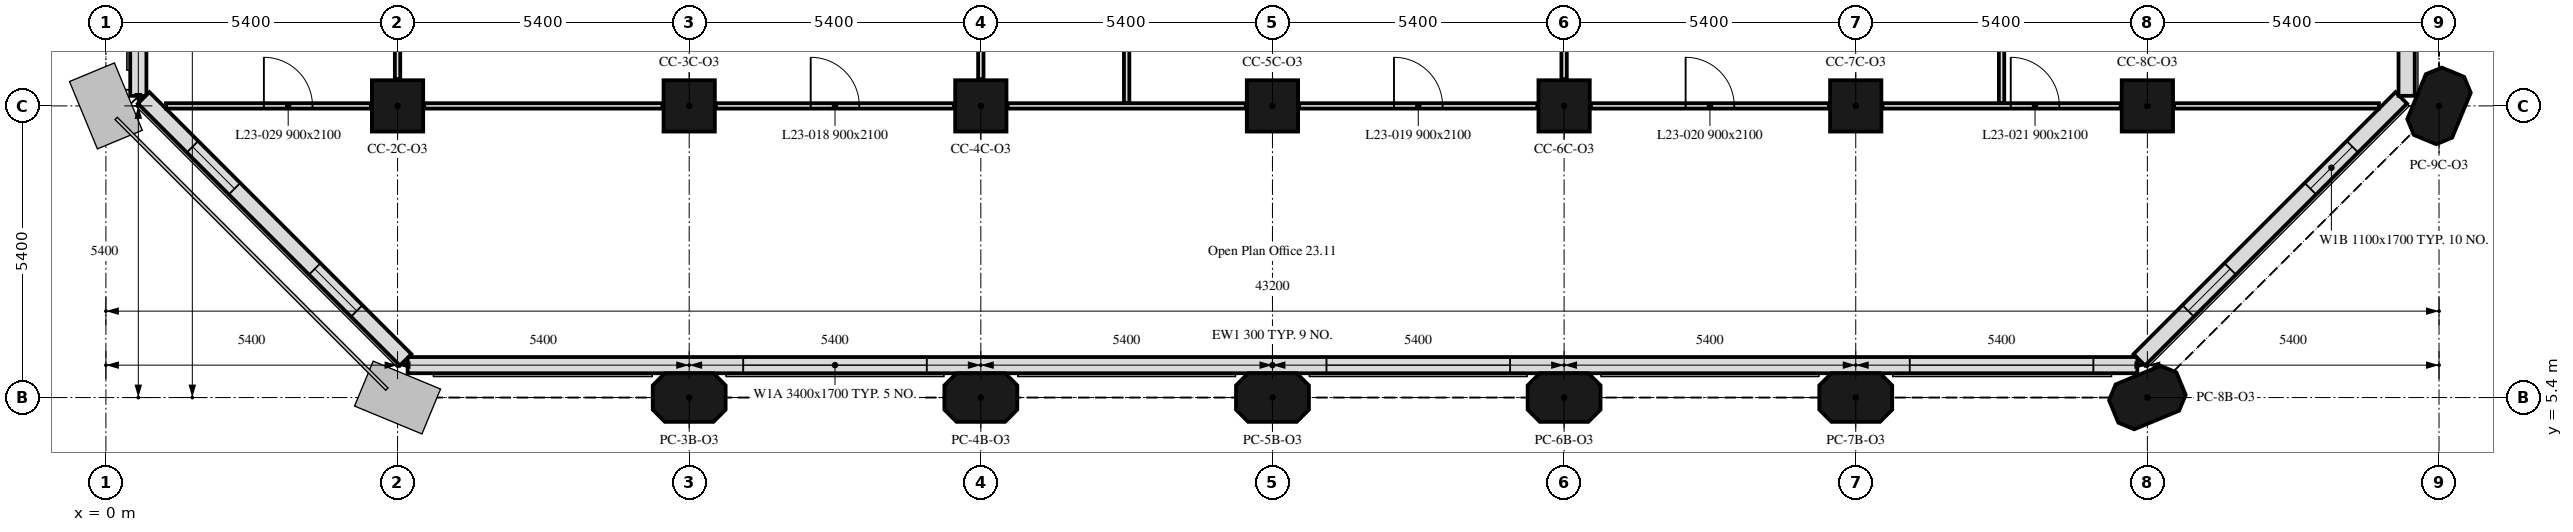
"""IFC4 building model, lengths in metres.
Left out: names, types, materials, properties, quantities, classifications, styles, units other than length and angle.
Written with IfcOpenShell. Run it as: python <this file> out.ifc"""

import sys

from ifc_helpers import new_model, si_unit, direction, frame, frame_2d, origin, origin_2d, place, context, subcontext, project, spatial, polyline, rectangle, outline, extrude, element, fill, save


model = new_model("IFC4")
c1 = context("Model", 3, precision=1e-05, world=origin(), true_north=direction((0.0, 1.0)))
c2 = subcontext(c1, "Body", "Model", "MODEL_VIEW")
j1 = project(units=[si_unit("LENGTHUNIT", "METRE"), si_unit("PLANEANGLEUNIT", "RADIAN")], contexts=[c1])
p1 = place(None, origin())
s1 = spatial("IfcSite", under=j1, at=p1, CompositionType="ELEMENT")
p2 = place(p1, origin())
s2 = spatial("IfcBuilding", under=s1, at=p2, CompositionType="ELEMENT")
p3 = place(p2, frame((0.0, 0.0, 99.2)))
s3 = spatial("IfcBuildingStorey", under=s2, at=p3, CompositionType="ELEMENT", Elevation=99.2)
for number, where, z_axis, x_axis in (
    (1, (10.8, 5.4, 0.0), (0.0, 0.0, 1.0), (1.0, 0.0, 0.0)),
    (2, (16.2, 5.4, 0.0), (0.0, 0.0, 1.0), (1.0, 0.0, 0.0)),
    (3, (21.6, 5.4, 0.0), (0.0, 0.0, 1.0), (1.0, 0.0, 0.0)),
    (4, (27.0, 5.4, 0.0), (0.0, 0.0, 1.0), (1.0, 0.0, 0.0)),
    (5, (32.4, 5.4, 0.0), (0.0, 0.0, 1.0), (1.0, 0.0, 0.0)),
    (6, (37.8, 5.4, 0.0), (0.0, 0.0, 1.0), (0.924, 0.383, 0.0)),
):
    element("IfcColumn", number, at=place(p3, frame(where, z_axis=z_axis, x_axis=x_axis)), inside=s3, PredefinedType="COLUMN", context=c2, shape_type="SweptSolid", body=[
        extrude(outline(polyline([(-0.45, -0.45), (0.45, -0.45), (0.675, -0.225), (0.675, 0.225), (0.45, 0.45), (-0.45, 0.45), (-0.675, 0.225), (-0.675, -0.225), (-0.45, -0.45)])), origin(), (0.0, 0.0, 1.0), 3.5),
    ])
for number, where, z_axis, x_axis in (
    (7, (5.4, 10.8, 0.0), (0.0, 0.0, 1.0), (1.0, 0.0, 0.0)),
    (8, (10.8, 10.8, 0.0), (0.0, 0.0, 1.0), (1.0, 0.0, 0.0)),
    (9, (16.2, 10.8, 0.0), (0.0, 0.0, 1.0), (1.0, 0.0, 0.0)),
    (10, (21.6, 10.8, 0.0), (0.0, 0.0, 1.0), (1.0, 0.0, 0.0)),
    (11, (27.0, 10.8, 0.0), (0.0, 0.0, 1.0), (1.0, 0.0, 0.0)),
    (12, (32.4, 10.8, 0.0), (0.0, 0.0, 1.0), (1.0, 0.0, 0.0)),
    (13, (37.8, 10.8, 0.0), (0.0, 0.0, 1.0), (1.0, 0.0, 0.0)),
):
    element("IfcColumn", number, at=place(p3, frame(where, z_axis=z_axis, x_axis=x_axis)), inside=s3, PredefinedType="COLUMN", context=c2, shape_type="SweptSolid", body=[
        extrude(rectangle(XDim=0.95, YDim=0.95, at=origin_2d()), origin(), (0.0, 0.0, 1.0), 3.5),
    ])
p4 = place(p3, frame((43.2, 10.8, 0.0), z_axis=(0.0, 0.0, 1.0), x_axis=(0.382683432365, 0.923879532511, 0.0)))
e14 = element("IfcColumn", 14, at=p4, inside=s3, PredefinedType="COLUMN", context=c2, shape_type="SweptSolid", body=[
    extrude(outline(polyline([(-0.45, -0.45), (0.45, -0.45), (0.675, -0.225), (0.675, 0.225), (0.45, 0.45), (-0.45, 0.45), (-0.675, 0.225), (-0.675, -0.225), (-0.45, -0.45)])), origin(), (0.0, 0.0, 1.0), 3.5),
])
p5 = place(p3, frame((5.586, 6.0, 0.0), z_axis=(0.0, 0.0, 1.0), x_axis=(1.0, 0.0, 0.0)))
e15 = element("IfcWall", 15, at=p5, inside=s3, PredefinedType="SOLIDWALL", context=c2, shape_type="SweptSolid", body=[
    extrude(rectangle(XDim=32.027, YDim=0.3, at=frame_2d((16.014, 0.0))), origin(), (0.0, 0.0, 1.0), 3.5),
])
p6 = place(p5, frame((6.214, 0.0, 0.9)))
e16 = element("IfcOpeningElement", 16, at=p6, cuts=e15, PredefinedType="OPENING", context=c2, shape_type="SweptSolid", body=[
    extrude(rectangle(XDim=3.4, YDim=1.7, at=frame_2d((1.7, 0.85))), frame((0.0, 0.16, 0.0), z_axis=(0.0, -1.0, 0.0), x_axis=(1.0, 0.0, 0.0)), (0.0, 0.0, 1.0), 0.32),
])
p7 = place(p5, frame((17.014, 0.0, 0.9)))
e17 = element("IfcOpeningElement", 17, at=p7, cuts=e15, PredefinedType="OPENING", context=c2, shape_type="SweptSolid", body=[
    extrude(rectangle(XDim=3.4, YDim=1.7, at=frame_2d((1.7, 0.85))), frame((0.0, 0.16, 0.0), z_axis=(0.0, -1.0, 0.0), x_axis=(1.0, 0.0, 0.0)), (0.0, 0.0, 1.0), 0.32),
])
p8 = place(p5, frame((27.814, 0.0, 0.9)))
e18 = element("IfcOpeningElement", 18, at=p8, cuts=e15, PredefinedType="OPENING", context=c2, shape_type="SweptSolid", body=[
    extrude(rectangle(XDim=3.4, YDim=1.7, at=frame_2d((1.7, 0.85))), frame((0.0, 0.16, 0.0), z_axis=(0.0, -1.0, 0.0), x_axis=(1.0, 0.0, 0.0)), (0.0, 0.0, 1.0), 0.32),
])
p9 = place(p3, frame((37.65, 6.099, 0.0), z_axis=(0.0, 0.0, 1.0), x_axis=(0.707106781187, 0.707106781187, 0.0)))
e19 = element("IfcWall", 19, at=p9, inside=s3, PredefinedType="SOLIDWALL", context=c2, shape_type="SweptSolid", body=[
    extrude(rectangle(XDim=6.86, YDim=0.3, at=frame_2d((3.43, 0.0))), origin(), (0.0, 0.0, 1.0), 3.5),
])
p10 = place(p9, frame((1.28, 0.0, 0.9)))
e20 = element("IfcOpeningElement", 20, at=p10, cuts=e19, PredefinedType="OPENING", context=c2, shape_type="SweptSolid", body=[
    extrude(rectangle(XDim=1.1, YDim=1.7, at=frame_2d((0.55, 0.85))), frame((0.0, 0.16, 0.0), z_axis=(0.0, -1.0, 0.0), x_axis=(1.0, 0.0, 0.0)), (0.0, 0.0, 1.0), 0.32),
])
p11 = place(p9, frame((4.48, 0.0, 0.9)))
e21 = element("IfcOpeningElement", 21, at=p11, cuts=e19, PredefinedType="OPENING", context=c2, shape_type="SweptSolid", body=[
    extrude(rectangle(XDim=1.1, YDim=1.7, at=frame_2d((0.55, 0.85))), frame((0.0, 0.16, 0.0), z_axis=(0.0, -1.0, 0.0), x_axis=(1.0, 0.0, 0.0)), (0.0, 0.0, 1.0), 0.32),
])
p12 = place(p3, frame((42.6, 10.986, 0.0), z_axis=(0.0, 0.0, 1.0), x_axis=(0.0, 1.0, 0.0)))
e22 = element("IfcWall", 22, at=p12, inside=s3, PredefinedType="SOLIDWALL", context=c2, shape_type="SweptSolid", body=[
    extrude(rectangle(XDim=5.214, YDim=0.3, at=frame_2d((2.607, 0.0))), origin(), (0.0, 0.0, 1.0), 3.5),
])
p13 = place(p3, frame((0.6, 43.014, 0.0), z_axis=(0.0, 0.0, 1.0), x_axis=(0.0, -1.0, 0.0)))
e23 = element("IfcWall", 23, at=p13, inside=s3, PredefinedType="SOLIDWALL", context=c2, shape_type="SweptSolid", body=[
    extrude(rectangle(XDim=32.027, YDim=0.3, at=frame_2d((16.014, 0.0))), origin(), (0.0, 0.0, 1.0), 3.5),
])
p14 = place(p13, frame((28.164, 0.0, 0.9)))
e24 = element("IfcOpeningElement", 24, at=p14, cuts=e23, PredefinedType="OPENING", context=c2, shape_type="SweptSolid", body=[
    extrude(rectangle(XDim=1.1, YDim=1.7, at=frame_2d((0.55, 0.85))), frame((0.0, 0.16, 0.0), z_axis=(0.0, -1.0, 0.0), x_axis=(1.0, 0.0, 0.0)), (0.0, 0.0, 1.0), 0.32),
])
p15 = place(p13, frame((29.764, 0.0, 0.9)))
e25 = element("IfcOpeningElement", 25, at=p15, cuts=e23, PredefinedType="OPENING", context=c2, shape_type="SweptSolid", body=[
    extrude(rectangle(XDim=1.1, YDim=1.7, at=frame_2d((0.55, 0.85))), frame((0.0, 0.16, 0.0), z_axis=(0.0, -1.0, 0.0), x_axis=(1.0, 0.0, 0.0)), (0.0, 0.0, 1.0), 0.32),
])
p16 = place(p3, frame((0.699, 10.949, 0.0), z_axis=(0.0, 0.0, 1.0), x_axis=(0.707106781187, -0.707106781187, 0.0)))
e26 = element("IfcWall", 26, at=p16, inside=s3, PredefinedType="SOLIDWALL", context=c2, shape_type="SweptSolid", body=[
    extrude(rectangle(XDim=6.86, YDim=0.3, at=frame_2d((3.43, 0.0))), origin(), (0.0, 0.0, 1.0), 3.5),
])
p17 = place(p16, frame((1.28, 0.0, 0.9)))
e27 = element("IfcOpeningElement", 27, at=p17, cuts=e26, PredefinedType="OPENING", context=c2, shape_type="SweptSolid", body=[
    extrude(rectangle(XDim=1.1, YDim=1.7, at=frame_2d((0.55, 0.85))), frame((0.0, 0.16, 0.0), z_axis=(0.0, -1.0, 0.0), x_axis=(1.0, 0.0, 0.0)), (0.0, 0.0, 1.0), 0.32),
])
p18 = place(p16, frame((4.48, 0.0, 0.9)))
e28 = element("IfcOpeningElement", 28, at=p18, cuts=e26, PredefinedType="OPENING", context=c2, shape_type="SweptSolid", body=[
    extrude(rectangle(XDim=1.1, YDim=1.7, at=frame_2d((0.55, 0.85))), frame((0.0, 0.16, 0.0), z_axis=(0.0, -1.0, 0.0), x_axis=(1.0, 0.0, 0.0)), (0.0, 0.0, 1.0), 0.32),
])
p19 = place(p3, frame((1.112, 10.8, 0.0), z_axis=(0.0, 0.0, 1.0), x_axis=(1.0, 0.0, 0.0)))
e29 = element("IfcWall", 29, at=p19, inside=s3, PredefinedType="PARTITIONING", context=c2, shape_type="SweptSolid", body=[
    extrude(rectangle(XDim=3.793, YDim=0.1, at=frame_2d((1.896, 0.0))), origin(), (0.0, 0.0, 1.0), 3.5),
])
p20 = place(p19, frame((1.813, 0.0, 0.0)))
e30 = element("IfcOpeningElement", 30, at=p20, cuts=e29, PredefinedType="OPENING", context=c2, shape_type="SweptSolid", body=[
    extrude(rectangle(XDim=0.9, YDim=2.1, at=frame_2d((0.45, 1.05))), frame((0.0, 0.05, 0.0), z_axis=(0.0, -1.0, 0.0), x_axis=(1.0, 0.0, 0.0)), (0.0, 0.0, 1.0), 0.1),
])
p21 = place(p3, frame((5.4, 11.295, 0.0), z_axis=(0.0, 0.0, 1.0), x_axis=(0.0, 1.0, 0.0)))
e31 = element("IfcWall", 31, at=p21, inside=s3, PredefinedType="PARTITIONING", context=c2, shape_type="SweptSolid", body=[
    extrude(rectangle(XDim=2.13, YDim=0.1, at=frame_2d((1.065, 0.0))), origin(), (0.0, 0.0, 1.0), 3.5),
])
p22 = place(p3, frame((5.895, 10.8, 0.0), z_axis=(0.0, 0.0, 1.0), x_axis=(1.0, 0.0, 0.0)))
e32 = element("IfcWall", 32, at=p22, inside=s3, PredefinedType="PARTITIONING", context=c2, shape_type="SweptSolid", body=[
    extrude(rectangle(XDim=4.41, YDim=0.1, at=frame_2d((2.205, 0.0))), origin(), (0.0, 0.0, 1.0), 3.5),
])
p23 = place(p3, frame((11.295, 10.8, 0.0), z_axis=(0.0, 0.0, 1.0), x_axis=(1.0, 0.0, 0.0)))
e33 = element("IfcWall", 33, at=p23, inside=s3, PredefinedType="PARTITIONING", context=c2, shape_type="SweptSolid", body=[
    extrude(rectangle(XDim=4.41, YDim=0.1, at=frame_2d((2.205, 0.0))), origin(), (0.0, 0.0, 1.0), 3.5),
])
p24 = place(p23, frame((1.755, 0.0, 0.0)))
e34 = element("IfcOpeningElement", 34, at=p24, cuts=e33, PredefinedType="OPENING", context=c2, shape_type="SweptSolid", body=[
    extrude(rectangle(XDim=0.9, YDim=2.1, at=frame_2d((0.45, 1.05))), frame((0.0, 0.05, 0.0), z_axis=(0.0, -1.0, 0.0), x_axis=(1.0, 0.0, 0.0)), (0.0, 0.0, 1.0), 0.1),
])
p25 = place(p3, frame((16.2, 11.295, 0.0), z_axis=(0.0, 0.0, 1.0), x_axis=(0.0, 1.0, 0.0)))
e35 = element("IfcWall", 35, at=p25, inside=s3, PredefinedType="PARTITIONING", context=c2, shape_type="SweptSolid", body=[
    extrude(rectangle(XDim=2.13, YDim=0.1, at=frame_2d((1.065, 0.0))), origin(), (0.0, 0.0, 1.0), 3.5),
])
p26 = place(p3, frame((18.9, 10.85, 0.0), z_axis=(0.0, 0.0, 1.0), x_axis=(0.0, 1.0, 0.0)))
e36 = element("IfcWall", 36, at=p26, inside=s3, PredefinedType="PARTITIONING", context=c2, shape_type="SweptSolid", body=[
    extrude(rectangle(XDim=2.575, YDim=0.1, at=frame_2d((1.288, 0.0))), origin(), (0.0, 0.0, 1.0), 3.5),
])
p27 = place(p3, frame((16.695, 10.8, 0.0), z_axis=(0.0, 0.0, 1.0), x_axis=(1.0, 0.0, 0.0)))
e37 = element("IfcWall", 37, at=p27, inside=s3, PredefinedType="PARTITIONING", context=c2, shape_type="SweptSolid", body=[
    extrude(rectangle(XDim=4.41, YDim=0.1, at=frame_2d((2.205, 0.0))), origin(), (0.0, 0.0, 1.0), 3.5),
])
p28 = place(p3, frame((22.095, 10.8, 0.0), z_axis=(0.0, 0.0, 1.0), x_axis=(1.0, 0.0, 0.0)))
e38 = element("IfcWall", 38, at=p28, inside=s3, PredefinedType="PARTITIONING", context=c2, shape_type="SweptSolid", body=[
    extrude(rectangle(XDim=4.41, YDim=0.1, at=frame_2d((2.205, 0.0))), origin(), (0.0, 0.0, 1.0), 3.5),
])
p29 = place(p28, frame((1.755, 0.0, 0.0)))
e39 = element("IfcOpeningElement", 39, at=p29, cuts=e38, PredefinedType="OPENING", context=c2, shape_type="SweptSolid", body=[
    extrude(rectangle(XDim=0.9, YDim=2.1, at=frame_2d((0.45, 1.05))), frame((0.0, 0.05, 0.0), z_axis=(0.0, -1.0, 0.0), x_axis=(1.0, 0.0, 0.0)), (0.0, 0.0, 1.0), 0.1),
])
p30 = place(p3, frame((27.0, 11.295, 0.0), z_axis=(0.0, 0.0, 1.0), x_axis=(0.0, 1.0, 0.0)))
e40 = element("IfcWall", 40, at=p30, inside=s3, PredefinedType="PARTITIONING", context=c2, shape_type="SweptSolid", body=[
    extrude(rectangle(XDim=2.13, YDim=0.1, at=frame_2d((1.065, 0.0))), origin(), (0.0, 0.0, 1.0), 3.5),
])
p31 = place(p3, frame((27.495, 10.8, 0.0), z_axis=(0.0, 0.0, 1.0), x_axis=(1.0, 0.0, 0.0)))
e41 = element("IfcWall", 41, at=p31, inside=s3, PredefinedType="PARTITIONING", context=c2, shape_type="SweptSolid", body=[
    extrude(rectangle(XDim=4.41, YDim=0.1, at=frame_2d((2.205, 0.0))), origin(), (0.0, 0.0, 1.0), 3.5),
])
p32 = place(p31, frame((1.755, 0.0, 0.0)))
e42 = element("IfcOpeningElement", 42, at=p32, cuts=e41, PredefinedType="OPENING", context=c2, shape_type="SweptSolid", body=[
    extrude(rectangle(XDim=0.9, YDim=2.1, at=frame_2d((0.45, 1.05))), frame((0.0, 0.05, 0.0), z_axis=(0.0, -1.0, 0.0), x_axis=(1.0, 0.0, 0.0)), (0.0, 0.0, 1.0), 0.1),
])
p33 = place(p3, frame((35.1, 10.85, 0.0), z_axis=(0.0, 0.0, 1.0), x_axis=(0.0, 1.0, 0.0)))
e43 = element("IfcWall", 43, at=p33, inside=s3, PredefinedType="PARTITIONING", context=c2, shape_type="SweptSolid", body=[
    extrude(rectangle(XDim=2.575, YDim=0.1, at=frame_2d((1.288, 0.0))), origin(), (0.0, 0.0, 1.0), 3.5),
])
p34 = place(p3, frame((32.895, 10.8, 0.0), z_axis=(0.0, 0.0, 1.0), x_axis=(1.0, 0.0, 0.0)))
e44 = element("IfcWall", 44, at=p34, inside=s3, PredefinedType="PARTITIONING", context=c2, shape_type="SweptSolid", body=[
    extrude(rectangle(XDim=4.41, YDim=0.1, at=frame_2d((2.205, 0.0))), origin(), (0.0, 0.0, 1.0), 3.5),
])
p35 = place(p34, frame((2.375, 0.0, 0.0)))
e45 = element("IfcOpeningElement", 45, at=p35, cuts=e44, PredefinedType="OPENING", context=c2, shape_type="SweptSolid", body=[
    extrude(rectangle(XDim=0.9, YDim=2.1, at=frame_2d((0.45, 1.05))), frame((0.0, 0.05, 0.0), z_axis=(0.0, -1.0, 0.0), x_axis=(1.0, 0.0, 0.0)), (0.0, 0.0, 1.0), 0.1),
])
p36 = place(p3, frame((38.295, 10.8, 0.0), z_axis=(0.0, 0.0, 1.0), x_axis=(1.0, 0.0, 0.0)))
e46 = element("IfcWall", 46, at=p36, inside=s3, PredefinedType="PARTITIONING", context=c2, shape_type="SweptSolid", body=[
    extrude(rectangle(XDim=3.793, YDim=0.1, at=frame_2d((1.896, 0.0))), origin(), (0.0, 0.0, 1.0), 3.5),
])
p37 = place(p6, origin())
e47 = element("IfcWindow", 47, at=p37, inside=s3, PartitioningType="SINGLE_PANEL", PredefinedType="WINDOW", context=c2, shape_type="SweptSolid", body=[
    extrude(rectangle(XDim=3.4, YDim=1.7, at=frame_2d((1.7, 0.85))), frame((0.0, 0.03, 0.0), z_axis=(0.0, -1.0, 0.0), x_axis=(1.0, 0.0, 0.0)), (0.0, 0.0, 1.0), 0.06),
])
fill(e16, e47)
p38 = place(p7, origin())
e48 = element("IfcWindow", 48, at=p38, inside=s3, PartitioningType="SINGLE_PANEL", PredefinedType="WINDOW", context=c2, shape_type="SweptSolid", body=[
    extrude(rectangle(XDim=3.4, YDim=1.7, at=frame_2d((1.7, 0.85))), frame((0.0, 0.03, 0.0), z_axis=(0.0, -1.0, 0.0), x_axis=(1.0, 0.0, 0.0)), (0.0, 0.0, 1.0), 0.06),
])
fill(e17, e48)
p39 = place(p8, origin())
e49 = element("IfcWindow", 49, at=p39, inside=s3, PartitioningType="SINGLE_PANEL", PredefinedType="WINDOW", context=c2, shape_type="SweptSolid", body=[
    extrude(rectangle(XDim=3.4, YDim=1.7, at=frame_2d((1.7, 0.85))), frame((0.0, 0.03, 0.0), z_axis=(0.0, -1.0, 0.0), x_axis=(1.0, 0.0, 0.0)), (0.0, 0.0, 1.0), 0.06),
])
fill(e18, e49)
p40 = place(p10, origin())
e50 = element("IfcWindow", 50, at=p40, inside=s3, PartitioningType="SINGLE_PANEL", PredefinedType="WINDOW", context=c2, shape_type="SweptSolid", body=[
    extrude(rectangle(XDim=1.1, YDim=1.7, at=frame_2d((0.55, 0.85))), frame((0.0, 0.03, 0.0), z_axis=(0.0, -1.0, 0.0), x_axis=(1.0, 0.0, 0.0)), (0.0, 0.0, 1.0), 0.06),
])
fill(e20, e50)
p41 = place(p11, origin())
e51 = element("IfcWindow", 51, at=p41, inside=s3, PartitioningType="SINGLE_PANEL", PredefinedType="WINDOW", context=c2, shape_type="SweptSolid", body=[
    extrude(rectangle(XDim=1.1, YDim=1.7, at=frame_2d((0.55, 0.85))), frame((0.0, 0.03, 0.0), z_axis=(0.0, -1.0, 0.0), x_axis=(1.0, 0.0, 0.0)), (0.0, 0.0, 1.0), 0.06),
])
fill(e21, e51)
p42 = place(p17, origin())
e52 = element("IfcWindow", 52, at=p42, inside=s3, PartitioningType="SINGLE_PANEL", PredefinedType="WINDOW", context=c2, shape_type="SweptSolid", body=[
    extrude(rectangle(XDim=1.1, YDim=1.7, at=frame_2d((0.55, 0.85))), frame((0.0, 0.03, 0.0), z_axis=(0.0, -1.0, 0.0), x_axis=(1.0, 0.0, 0.0)), (0.0, 0.0, 1.0), 0.06),
])
fill(e27, e52)
p43 = place(p18, origin())
e53 = element("IfcWindow", 53, at=p43, inside=s3, PartitioningType="SINGLE_PANEL", PredefinedType="WINDOW", context=c2, shape_type="SweptSolid", body=[
    extrude(rectangle(XDim=1.1, YDim=1.7, at=frame_2d((0.55, 0.85))), frame((0.0, 0.03, 0.0), z_axis=(0.0, -1.0, 0.0), x_axis=(1.0, 0.0, 0.0)), (0.0, 0.0, 1.0), 0.06),
])
fill(e28, e53)
p44 = place(p24, origin())
e54 = element("IfcDoor", 54, at=p44, inside=s3, OperationType="SINGLE_SWING_LEFT", PredefinedType="DOOR", context=c2, shape_type="SweptSolid", body=[
    extrude(rectangle(XDim=0.9, YDim=2.1, at=frame_2d((0.45, 1.05))), frame((0.0, 0.025, 0.0), z_axis=(0.0, -1.0, 0.0), x_axis=(1.0, 0.0, 0.0)), (0.0, 0.0, 1.0), 0.05),
])
fill(e34, e54)
p45 = place(p29, origin())
e55 = element("IfcDoor", 55, at=p45, inside=s3, OperationType="SINGLE_SWING_RIGHT", PredefinedType="DOOR", context=c2, shape_type="SweptSolid", body=[
    extrude(rectangle(XDim=0.9, YDim=2.1, at=frame_2d((0.45, 1.05))), frame((0.0, 0.025, 0.0), z_axis=(0.0, -1.0, 0.0), x_axis=(1.0, 0.0, 0.0)), (0.0, 0.0, 1.0), 0.05),
])
fill(e39, e55)
p46 = place(p32, origin())
e56 = element("IfcDoor", 56, at=p46, inside=s3, OperationType="SINGLE_SWING_LEFT", PredefinedType="DOOR", context=c2, shape_type="SweptSolid", body=[
    extrude(rectangle(XDim=0.9, YDim=2.1, at=frame_2d((0.45, 1.05))), frame((0.0, 0.025, 0.0), z_axis=(0.0, -1.0, 0.0), x_axis=(1.0, 0.0, 0.0)), (0.0, 0.0, 1.0), 0.05),
])
fill(e42, e56)
p47 = place(p35, origin())
e57 = element("IfcDoor", 57, at=p47, inside=s3, OperationType="SINGLE_SWING_RIGHT", PredefinedType="DOOR", context=c2, shape_type="SweptSolid", body=[
    extrude(rectangle(XDim=0.9, YDim=2.1, at=frame_2d((0.45, 1.05))), frame((0.0, 0.025, 0.0), z_axis=(0.0, -1.0, 0.0), x_axis=(1.0, 0.0, 0.0)), (0.0, 0.0, 1.0), 0.05),
])
fill(e45, e57)
p48 = place(p20, origin())
e58 = element("IfcDoor", 58, at=p48, inside=s3, OperationType="SINGLE_SWING_RIGHT", PredefinedType="DOOR", context=c2, shape_type="SweptSolid", body=[
    extrude(rectangle(XDim=0.9, YDim=2.1, at=frame_2d((0.45, 1.05))), frame((0.0, 0.025, 0.0), z_axis=(0.0, -1.0, 0.0), x_axis=(1.0, 0.0, 0.0)), (0.0, 0.0, 1.0), 0.05),
])
fill(e30, e58)
save(model, sys.argv[1])
